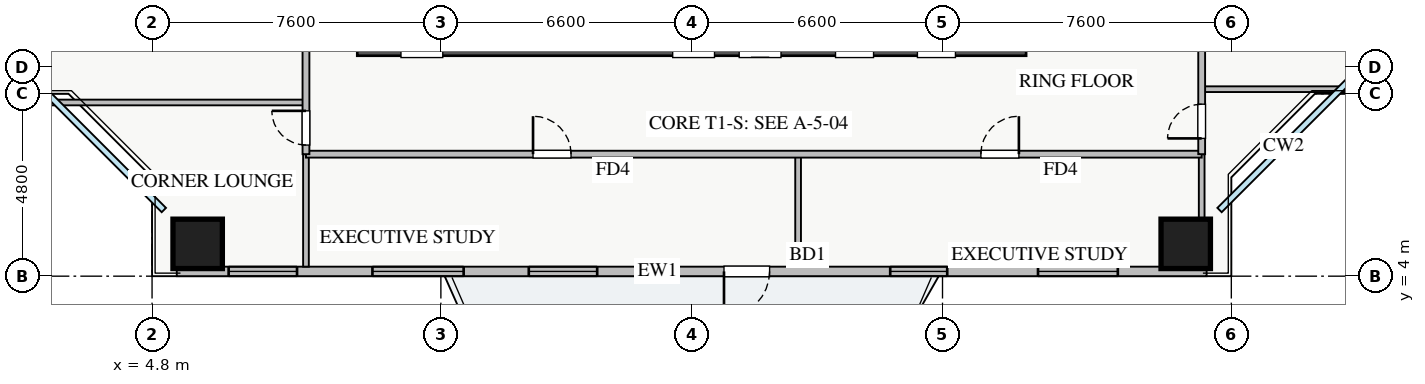
"""IFC4 building model, lengths in metres.
Left out: names, types, materials, properties, quantities, classifications, styles, units other than length and angle.
Written with IfcOpenShell. Run it as: python <this file> out.ifc"""

import sys

from ifc_helpers import new_model, si_unit, direction, frame, frame_2d, origin, origin_2d, place, context, subcontext, project, spatial, rectangle, extrude, source, transform, mapped, element, fill, save


model = new_model("IFC4")
c1 = context("Model", 3, precision=1e-05, world=origin(), true_north=direction((0.0, 1.0)))
c2 = subcontext(c1, "Body", "Model", "MODEL_VIEW")
j1 = project(units=[si_unit("LENGTHUNIT", "METRE"), si_unit("PLANEANGLEUNIT", "RADIAN")], contexts=[c1])
p1 = place(None, origin())
s1 = spatial("IfcSite", under=j1, at=p1, CompositionType="ELEMENT")
p2 = place(p1, origin())
s2 = spatial("IfcBuilding", under=s1, at=p2, CompositionType="ELEMENT")
p3 = place(p2, frame((0.0, 0.0, 79.5)))
s3 = spatial("IfcBuildingStorey", under=s2, at=p3, CompositionType="ELEMENT", Elevation=79.5)
p4 = place(p3, frame((10.2, 10.2, 0.0), z_axis=(0.0, 0.0, 1.0), x_axis=(1.0, 0.0, 0.0)))
e1 = element("IfcWall", 1, at=p4, inside=s3, PredefinedType="SHEAR", context=c2, shape_type="SweptSolid", body=[
    extrude(rectangle(XDim=17.6, YDim=0.8, at=frame_2d((8.8, 0.0))), origin(), (0.0, 0.0, 1.0), 3.25),
])
p5 = place(p4, frame((1.15, 0.0, 0.0)))
e2 = element("IfcOpeningElement", 2, at=p5, cuts=e1, PredefinedType="OPENING", context=c2, shape_type="SweptSolid", body=[
    extrude(rectangle(XDim=1.1, YDim=2.05, at=frame_2d((0.55, 1.025))), frame((0.0, 0.41, 0.0), z_axis=(0.0, -1.0, 0.0), x_axis=(1.0, 0.0, 0.0)), (0.0, 0.0, 1.0), 0.82),
])
p6 = place(p4, frame((8.3, 0.0, 0.0)))
e3 = element("IfcOpeningElement", 3, at=p6, cuts=e1, PredefinedType="OPENING", context=c2, shape_type="SweptSolid", body=[
    extrude(rectangle(XDim=1.1, YDim=2.05, at=frame_2d((0.55, 1.025))), frame((0.0, 0.41, 0.0), z_axis=(0.0, -1.0, 0.0), x_axis=(1.0, 0.0, 0.0)), (0.0, 0.0, 1.0), 0.82),
])
p7 = place(p4, frame((10.05, 0.0, 0.0)))
e4 = element("IfcOpeningElement", 4, at=p7, cuts=e1, PredefinedType="OPENING", context=c2, shape_type="SweptSolid", body=[
    extrude(rectangle(XDim=1.1, YDim=2.05, at=frame_2d((0.55, 1.025))), frame((0.0, 0.41, 0.0), z_axis=(0.0, -1.0, 0.0), x_axis=(1.0, 0.0, 0.0)), (0.0, 0.0, 1.0), 0.82),
])
p8 = place(p4, frame((14.74, 0.0, 0.0)))
e5 = element("IfcOpeningElement", 5, at=p8, cuts=e1, PredefinedType="OPENING", context=c2, shape_type="SweptSolid", body=[
    extrude(rectangle(XDim=1.0, YDim=2.05, at=frame_2d((0.5, 1.025))), frame((0.0, 0.41, 0.0), z_axis=(0.0, -1.0, 0.0), x_axis=(1.0, 0.0, 0.0)), (0.0, 0.0, 1.0), 0.82),
])
p9 = place(p4, frame((12.585, 0.0, 0.0)))
e6 = element("IfcOpeningElement", 6, at=p9, cuts=e1, PredefinedType="OPENING", context=c2, shape_type="SweptSolid", body=[
    extrude(rectangle(XDim=1.0, YDim=2.05, at=frame_2d((0.5, 1.025))), frame((0.0, 0.41, 0.0), z_axis=(0.0, -1.0, 0.0), x_axis=(1.0, 0.0, 0.0)), (0.0, 0.0, 1.0), 0.82),
])
m1 = source(origin(), c2, "Body", "SweptSolid", [
    extrude(rectangle(XDim=1.3, YDim=1.3, at=origin_2d()), origin(), (0.0, 0.0, 1.0), 3.25),
])
for number, where, z_axis, x_axis in (
    (7, (6.0, 4.85, 0.0), (0.0, 0.0, 1.0), (1.0, 0.0, 0.0)),
    (8, (32.0, 4.85, 0.0), (0.0, 0.0, 1.0), (1.0, 0.0, 0.0)),
):
    element("IfcColumn", number, at=place(p3, frame(where, z_axis=z_axis, x_axis=x_axis)), inside=s3, PredefinedType="COLUMN", context=c2, shape_type="MappedRepresentation", body=[
        mapped(m1, transform((0.0, 0.0, 0.0), x_axis=(1.0, 0.0, 0.0), y_axis=(0.0, 1.0, 0.0), z_axis=(0.0, 0.0, 1.0), scale=1.0)),
    ])
p10 = place(p3, frame((5.45, 4.125, 0.0), z_axis=(0.0, 0.0, 1.0), x_axis=(1.0, 0.0, 0.0)))
e9 = element("IfcWall", 9, at=p10, inside=s3, PredefinedType="STANDARD", context=c2, shape_type="SweptSolid", body=[
    extrude(rectangle(XDim=27.1, YDim=0.25, at=frame_2d((13.55, 0.0))), origin(), (0.0, 0.0, 1.0), 2.61),
])
p11 = place(p10, frame((14.4, 0.0, 0.0)))
e10 = element("IfcOpeningElement", 10, at=p11, cuts=e9, PredefinedType="OPENING", context=c2, shape_type="SweptSolid", body=[
    extrude(rectangle(XDim=1.2, YDim=2.1, at=frame_2d((0.6, 1.05))), frame((0.0, 0.135, 0.0), z_axis=(0.0, -1.0, 0.0), x_axis=(1.0, 0.0, 0.0)), (0.0, 0.0, 1.0), 0.27),
])
p12 = place(p10, frame((1.365, 0.0, 0.9)))
e11 = element("IfcOpeningElement", 11, at=p12, cuts=e9, PredefinedType="OPENING", context=c2, shape_type="SweptSolid", body=[
    extrude(rectangle(XDim=1.8, YDim=1.5, at=frame_2d((0.9, 0.75))), frame((0.0, 0.135, 0.0), z_axis=(0.0, -1.0, 0.0), x_axis=(1.0, 0.0, 0.0)), (0.0, 0.0, 1.0), 0.27),
])
p13 = place(p10, frame((9.263, 0.0, 0.9)))
e12 = element("IfcOpeningElement", 12, at=p13, cuts=e9, PredefinedType="OPENING", context=c2, shape_type="SweptSolid", body=[
    extrude(rectangle(XDim=1.8, YDim=1.45, at=frame_2d((0.9, 0.725))), frame((0.0, 0.135, 0.0), z_axis=(0.0, -1.0, 0.0), x_axis=(1.0, 0.0, 0.0)), (0.0, 0.0, 1.0), 0.27),
])
p14 = place(p10, frame((18.774, 0.0, 0.9)))
e13 = element("IfcOpeningElement", 13, at=p14, cuts=e9, PredefinedType="OPENING", context=c2, shape_type="SweptSolid", body=[
    extrude(rectangle(XDim=1.5, YDim=1.5, at=frame_2d((0.75, 0.75))), frame((0.0, 0.135, 0.0), z_axis=(0.0, -1.0, 0.0), x_axis=(1.0, 0.0, 0.0)), (0.0, 0.0, 1.0), 0.27),
])
p15 = place(p10, frame((22.663, 0.0, 0.9)))
e14 = element("IfcOpeningElement", 14, at=p15, cuts=e9, PredefinedType="OPENING", context=c2, shape_type="SweptSolid", body=[
    extrude(rectangle(XDim=2.1, YDim=1.48, at=frame_2d((1.05, 0.74))), frame((0.0, 0.135, 0.0), z_axis=(0.0, -1.0, 0.0), x_axis=(1.0, 0.0, 0.0)), (0.0, 0.0, 1.0), 0.27),
])
p16 = place(p10, frame((5.149, 0.0, 0.9)))
e15 = element("IfcOpeningElement", 15, at=p16, cuts=e9, PredefinedType="OPENING", context=c2, shape_type="SweptSolid", body=[
    extrude(rectangle(XDim=2.4, YDim=1.5, at=frame_2d((1.2, 0.75))), frame((0.0, 0.135, 0.0), z_axis=(0.0, -1.0, 0.0), x_axis=(1.0, 0.0, 0.0)), (0.0, 0.0, 1.0), 0.27),
])
for number, where, z_axis, x_axis in (
    (16, (21.8, 4.25, 0.0), (0.0, 0.0, 1.0), (0.0, 1.0, 0.0)),
    (17, (8.85, 4.25, 0.0), (0.0, 0.0, 1.0), (0.0, 1.0, 0.0)),
    (18, (32.42, 4.25, 0.0), (0.0, 0.0, 1.0), (0.0, 1.0, 0.0)),
):
    element("IfcWall", number, at=place(p3, frame(where, z_axis=z_axis, x_axis=x_axis)), inside=s3, PredefinedType="PARTITIONING", context=c2, shape_type="SweptSolid", body=[
        extrude(rectangle(XDim=2.96, YDim=0.15, at=frame_2d((1.48, 0.0))), origin(), (0.0, 0.0, 1.0), 3.07),
    ])
p17 = place(p3, frame((8.85, 7.21, 0.0), z_axis=(0.0, 0.0, 1.0), x_axis=(1.0, 0.0, 0.0)))
e19 = element("IfcWall", 19, at=p17, inside=s3, PredefinedType="PARTITIONING", context=c2, shape_type="SweptSolid", body=[
    extrude(rectangle(XDim=23.57, YDim=0.18, at=frame_2d((11.785, 0.0))), origin(), (0.0, 0.0, 1.0), 3.07),
])
p18 = place(p17, frame((5.975, 0.0, 0.0)))
e20 = element("IfcOpeningElement", 20, at=p18, cuts=e19, PredefinedType="OPENING", context=c2, shape_type="SweptSolid", body=[
    extrude(rectangle(XDim=1.0, YDim=2.05, at=frame_2d((0.5, 1.025))), frame((0.0, 0.1, 0.0), z_axis=(0.0, -1.0, 0.0), x_axis=(1.0, 0.0, 0.0)), (0.0, 0.0, 1.0), 0.2),
])
p19 = place(p17, frame((17.76, 0.0, 0.0)))
e21 = element("IfcOpeningElement", 21, at=p19, cuts=e19, PredefinedType="OPENING", context=c2, shape_type="SweptSolid", body=[
    extrude(rectangle(XDim=1.0, YDim=2.05, at=frame_2d((0.5, 1.025))), frame((0.0, 0.1, 0.0), z_axis=(0.0, -1.0, 0.0), x_axis=(1.0, 0.0, 0.0)), (0.0, 0.0, 1.0), 0.2),
])
p20 = place(p3, frame((0.25, 8.57, 0.0), z_axis=(0.0, 0.0, 1.0), x_axis=(1.0, 0.0, 0.0)))
e22 = element("IfcWall", 22, at=p20, inside=s3, PredefinedType="PARTITIONING", context=c2, shape_type="SweptSolid", body=[
    extrude(rectangle(XDim=8.6, YDim=0.15, at=frame_2d((4.3, 0.0))), origin(), (0.0, 0.0, 1.0), 3.07),
])
p21 = place(p3, frame((8.85, 7.21, 0.0), z_axis=(0.0, 0.0, 1.0), x_axis=(0.0, 1.0, 0.0)))
e23 = element("IfcWall", 23, at=p21, inside=s3, PredefinedType="PARTITIONING", context=c2, shape_type="SweptSolid", body=[
    extrude(rectangle(XDim=31.23, YDim=0.18, at=frame_2d((15.615, 0.0))), origin(), (0.0, 0.0, 1.0), 3.07),
])
p22 = place(p21, frame((30.09, 0.0, 0.0)))
e24 = element("IfcOpeningElement", 24, at=p22, cuts=e23, PredefinedType="OPENING", context=c2, shape_type="SweptSolid", body=[
    extrude(rectangle(XDim=0.9, YDim=2.05, at=frame_2d((0.45, 1.025))), frame((0.0, 0.1, 0.0), z_axis=(0.0, -1.0, 0.0), x_axis=(1.0, 0.0, 0.0)), (0.0, 0.0, 1.0), 0.2),
])
p23 = place(p21, frame((0.24, 0.0, 0.0)))
e25 = element("IfcOpeningElement", 25, at=p23, cuts=e23, PredefinedType="OPENING", context=c2, shape_type="SweptSolid", body=[
    extrude(rectangle(XDim=0.9, YDim=2.05, at=frame_2d((0.45, 1.025))), frame((0.0, 0.1, 0.0), z_axis=(0.0, -1.0, 0.0), x_axis=(1.0, 0.0, 0.0)), (0.0, 0.0, 1.0), 0.2),
])
p24 = place(p21, frame((5.895, 0.0, 0.0)))
e26 = element("IfcOpeningElement", 26, at=p24, cuts=e23, PredefinedType="OPENING", context=c2, shape_type="SweptSolid", body=[
    extrude(rectangle(XDim=1.0, YDim=2.05, at=frame_2d((0.5, 1.025))), frame((0.0, 0.1, 0.0), z_axis=(0.0, -1.0, 0.0), x_axis=(1.0, 0.0, 0.0)), (0.0, 0.0, 1.0), 0.2),
])
p25 = place(p21, frame((12.885, 0.0, 0.0)))
e27 = element("IfcOpeningElement", 27, at=p25, cuts=e23, PredefinedType="OPENING", context=c2, shape_type="SweptSolid", body=[
    extrude(rectangle(XDim=1.0, YDim=2.05, at=frame_2d((0.5, 1.025))), frame((0.0, 0.1, 0.0), z_axis=(0.0, -1.0, 0.0), x_axis=(1.0, 0.0, 0.0)), (0.0, 0.0, 1.0), 0.2),
])
p26 = place(p21, frame((21.96, 0.0, 0.0)))
e28 = element("IfcOpeningElement", 28, at=p26, cuts=e23, PredefinedType="OPENING", context=c2, shape_type="SweptSolid", body=[
    extrude(rectangle(XDim=1.0, YDim=2.05, at=frame_2d((0.5, 1.025))), frame((0.0, 0.1, 0.0), z_axis=(0.0, -1.0, 0.0), x_axis=(1.0, 0.0, 0.0)), (0.0, 0.0, 1.0), 0.2),
])
p27 = place(p3, frame((32.42, 8.92, 0.0), z_axis=(0.0, 0.0, 1.0), x_axis=(1.0, 0.0, 0.0)))
e29 = element("IfcWall", 29, at=p27, inside=s3, PredefinedType="PARTITIONING", context=c2, shape_type="SweptSolid", body=[
    extrude(rectangle(XDim=5.33, YDim=0.15, at=frame_2d((2.665, 0.0))), origin(), (0.0, 0.0, 1.0), 3.07),
])
p28 = place(p3, frame((32.42, 7.21, 0.0), z_axis=(0.0, 0.0, 1.0), x_axis=(0.0, 1.0, 0.0)))
e30 = element("IfcWall", 30, at=p28, inside=s3, PredefinedType="PARTITIONING", context=c2, shape_type="SweptSolid", body=[
    extrude(rectangle(XDim=31.23, YDim=0.18, at=frame_2d((15.615, 0.0))), origin(), (0.0, 0.0, 1.0), 2.821),
])
p29 = place(p28, frame((30.09, 0.0, 0.0)))
e31 = element("IfcOpeningElement", 31, at=p29, cuts=e30, PredefinedType="OPENING", context=c2, shape_type="SweptSolid", body=[
    extrude(rectangle(XDim=0.9, YDim=2.05, at=frame_2d((0.45, 1.025))), frame((0.0, 0.1, 0.0), z_axis=(0.0, -1.0, 0.0), x_axis=(1.0, 0.0, 0.0)), (0.0, 0.0, 1.0), 0.2),
])
p30 = place(p28, frame((0.415, 0.0, 0.0)))
e32 = element("IfcOpeningElement", 32, at=p30, cuts=e30, PredefinedType="OPENING", context=c2, shape_type="SweptSolid", body=[
    extrude(rectangle(XDim=0.9, YDim=2.05, at=frame_2d((0.45, 1.025))), frame((0.0, 0.1, 0.0), z_axis=(0.0, -1.0, 0.0), x_axis=(1.0, 0.0, 0.0)), (0.0, 0.0, 1.0), 0.2),
])
p31 = place(p28, frame((5.675, 0.0, 0.0)))
e33 = element("IfcOpeningElement", 33, at=p31, cuts=e30, PredefinedType="OPENING", context=c2, shape_type="SweptSolid", body=[
    extrude(rectangle(XDim=1.0, YDim=2.05, at=frame_2d((0.5, 1.025))), frame((0.0, 0.1, 0.0), z_axis=(0.0, -1.0, 0.0), x_axis=(1.0, 0.0, 0.0)), (0.0, 0.0, 1.0), 0.2),
])
p32 = place(p28, frame((12.575, 0.0, 0.0)))
e34 = element("IfcOpeningElement", 34, at=p32, cuts=e30, PredefinedType="OPENING", context=c2, shape_type="SweptSolid", body=[
    extrude(rectangle(XDim=1.0, YDim=2.05, at=frame_2d((0.5, 1.025))), frame((0.0, 0.1, 0.0), z_axis=(0.0, -1.0, 0.0), x_axis=(1.0, 0.0, 0.0)), (0.0, 0.0, 1.0), 0.2),
])
p33 = place(p28, frame((22.5, 0.0, 0.0)))
e35 = element("IfcOpeningElement", 35, at=p33, cuts=e30, PredefinedType="OPENING", context=c2, shape_type="SweptSolid", body=[
    extrude(rectangle(XDim=1.0, YDim=2.05, at=frame_2d((0.5, 1.025))), frame((0.0, 0.1, 0.0), z_axis=(0.0, -1.0, 0.0), x_axis=(1.0, 0.0, 0.0)), (0.0, 0.0, 1.0), 0.2),
])
m2 = source(origin(), c2, "Body", "SweptSolid", [
    extrude(rectangle(XDim=1.2, YDim=2.1, at=frame_2d((0.6, 1.05))), frame((0.0, 0.025, 0.0), z_axis=(0.0, -1.0, 0.0), x_axis=(1.0, 0.0, 0.0)), (0.0, 0.0, 1.0), 0.05),
])
p34 = place(p11, frame((1.2, 0.0, 0.0), z_axis=(0.0, 0.0, 1.0), x_axis=(-1.0, 0.0, 0.0)))
e36 = element("IfcDoor", 36, at=p34, inside=s3, OperationType="SINGLE_SWING_LEFT", PredefinedType="DOOR", context=c2, shape_type="MappedRepresentation", body=[
    mapped(m2, transform((0.0, 0.0, 0.0), x_axis=(1.0, 0.0, 0.0), y_axis=(0.0, 1.0, 0.0), z_axis=(0.0, 0.0, 1.0), scale=1.0)),
])
fill(e10, e36)
m3 = source(origin(), c2, "Body", "SweptSolid", [
    extrude(rectangle(XDim=1.8, YDim=1.5, at=frame_2d((0.9, 0.75))), frame((0.0, 0.03, 0.0), z_axis=(0.0, -1.0, 0.0), x_axis=(1.0, 0.0, 0.0)), (0.0, 0.0, 1.0), 0.06),
])
p35 = place(p12, origin())
e37 = element("IfcWindow", 37, at=p35, inside=s3, PartitioningType="TRIPLE_PANEL_VERTICAL", PredefinedType="WINDOW", context=c2, shape_type="MappedRepresentation", body=[
    mapped(m3, transform((0.0, 0.0, 0.0), x_axis=(1.0, 0.0, 0.0), y_axis=(0.0, 1.0, 0.0), z_axis=(0.0, 0.0, 1.0), scale=1.0)),
])
fill(e11, e37)
m4 = source(origin(), c2, "Body", "SweptSolid", [
    extrude(rectangle(XDim=1.8, YDim=1.45, at=frame_2d((0.9, 0.725))), frame((0.0, 0.03, 0.0), z_axis=(0.0, -1.0, 0.0), x_axis=(1.0, 0.0, 0.0)), (0.0, 0.0, 1.0), 0.06),
])
p36 = place(p13, origin())
e38 = element("IfcWindow", 38, at=p36, inside=s3, PartitioningType="DOUBLE_PANEL_VERTICAL", PredefinedType="WINDOW", context=c2, shape_type="MappedRepresentation", body=[
    mapped(m4, transform((0.0, 0.0, 0.0), x_axis=(1.0, 0.0, 0.0), y_axis=(0.0, 1.0, 0.0), z_axis=(0.0, 0.0, 1.0), scale=1.0)),
])
fill(e12, e38)
m5 = source(origin(), c2, "Body", "SweptSolid", [
    extrude(rectangle(XDim=1.5, YDim=1.5, at=frame_2d((0.75, 0.75))), frame((0.0, 0.03, 0.0), z_axis=(0.0, -1.0, 0.0), x_axis=(1.0, 0.0, 0.0)), (0.0, 0.0, 1.0), 0.06),
])
p37 = place(p14, origin())
e39 = element("IfcWindow", 39, at=p37, inside=s3, PartitioningType="DOUBLE_PANEL_VERTICAL", PredefinedType="WINDOW", context=c2, shape_type="MappedRepresentation", body=[
    mapped(m5, transform((0.0, 0.0, 0.0), x_axis=(1.0, 0.0, 0.0), y_axis=(0.0, 1.0, 0.0), z_axis=(0.0, 0.0, 1.0), scale=1.0)),
])
fill(e13, e39)
m6 = source(origin(), c2, "Body", "SweptSolid", [
    extrude(rectangle(XDim=2.1, YDim=1.48, at=frame_2d((1.05, 0.74))), frame((0.0, 0.03, 0.0), z_axis=(0.0, -1.0, 0.0), x_axis=(1.0, 0.0, 0.0)), (0.0, 0.0, 1.0), 0.06),
])
p38 = place(p15, origin())
e40 = element("IfcWindow", 40, at=p38, inside=s3, PartitioningType="TRIPLE_PANEL_VERTICAL", PredefinedType="WINDOW", context=c2, shape_type="MappedRepresentation", body=[
    mapped(m6, transform((0.0, 0.0, 0.0), x_axis=(1.0, 0.0, 0.0), y_axis=(0.0, 1.0, 0.0), z_axis=(0.0, 0.0, 1.0), scale=1.0)),
])
fill(e14, e40)
m7 = source(origin(), c2, "Body", "SweptSolid", [
    extrude(rectangle(XDim=1.0, YDim=2.05, at=frame_2d((0.5, 1.025))), frame((0.0, 0.025, 0.0), z_axis=(0.0, -1.0, 0.0), x_axis=(1.0, 0.0, 0.0)), (0.0, 0.0, 1.0), 0.05),
])
p39 = place(p18, origin())
e41 = element("IfcDoor", 41, at=p39, inside=s3, OperationType="SINGLE_SWING_LEFT", PredefinedType="DOOR", context=c2, shape_type="MappedRepresentation", body=[
    mapped(m7, transform((0.0, 0.0, 0.0), x_axis=(1.0, 0.0, 0.0), y_axis=(0.0, 1.0, 0.0), z_axis=(0.0, 0.0, 1.0), scale=1.0)),
])
fill(e20, e41)
p40 = place(p19, origin())
e42 = element("IfcDoor", 42, at=p40, inside=s3, OperationType="SINGLE_SWING_RIGHT", PredefinedType="DOOR", context=c2, shape_type="MappedRepresentation", body=[
    mapped(m7, transform((0.0, 0.0, 0.0), x_axis=(1.0, 0.0, 0.0), y_axis=(0.0, 1.0, 0.0), z_axis=(0.0, 0.0, 1.0), scale=1.0)),
])
fill(e21, e42)
m8 = source(origin(), c2, "Body", "SweptSolid", [
    extrude(rectangle(XDim=0.9, YDim=2.05, at=frame_2d((0.45, 1.025))), frame((0.0, 0.025, 0.0), z_axis=(0.0, -1.0, 0.0), x_axis=(1.0, 0.0, 0.0)), (0.0, 0.0, 1.0), 0.05),
])
p41 = place(p23, origin())
e43 = element("IfcDoor", 43, at=p41, inside=s3, OperationType="SINGLE_SWING_RIGHT", PredefinedType="DOOR", context=c2, shape_type="MappedRepresentation", body=[
    mapped(m8, transform((0.0, 0.0, 0.0), x_axis=(1.0, 0.0, 0.0), y_axis=(0.0, 1.0, 0.0), z_axis=(0.0, 0.0, 1.0), scale=1.0)),
])
fill(e25, e43)
p42 = place(p30, origin())
e44 = element("IfcDoor", 44, at=p42, inside=s3, OperationType="SINGLE_SWING_LEFT", PredefinedType="DOOR", context=c2, shape_type="MappedRepresentation", body=[
    mapped(m8, transform((0.0, 0.0, 0.0), x_axis=(1.0, 0.0, 0.0), y_axis=(0.0, 1.0, 0.0), z_axis=(0.0, 0.0, 1.0), scale=1.0)),
])
fill(e32, e44)
m9 = source(origin(), c2, "Body", "SweptSolid", [
    extrude(rectangle(XDim=2.4, YDim=1.5, at=frame_2d((1.2, 0.75))), frame((0.0, 0.03, 0.0), z_axis=(0.0, -1.0, 0.0), x_axis=(1.0, 0.0, 0.0)), (0.0, 0.0, 1.0), 0.06),
])
p43 = place(p16, origin())
e45 = element("IfcWindow", 45, at=p43, inside=s3, PartitioningType="TRIPLE_PANEL_VERTICAL", PredefinedType="WINDOW", context=c2, shape_type="MappedRepresentation", body=[
    mapped(m9, transform((0.0, 0.0, 0.0), x_axis=(1.0, 0.0, 0.0), y_axis=(0.0, 1.0, 0.0), z_axis=(0.0, 0.0, 1.0), scale=1.0)),
])
fill(e15, e45)
save(model, sys.argv[1])
